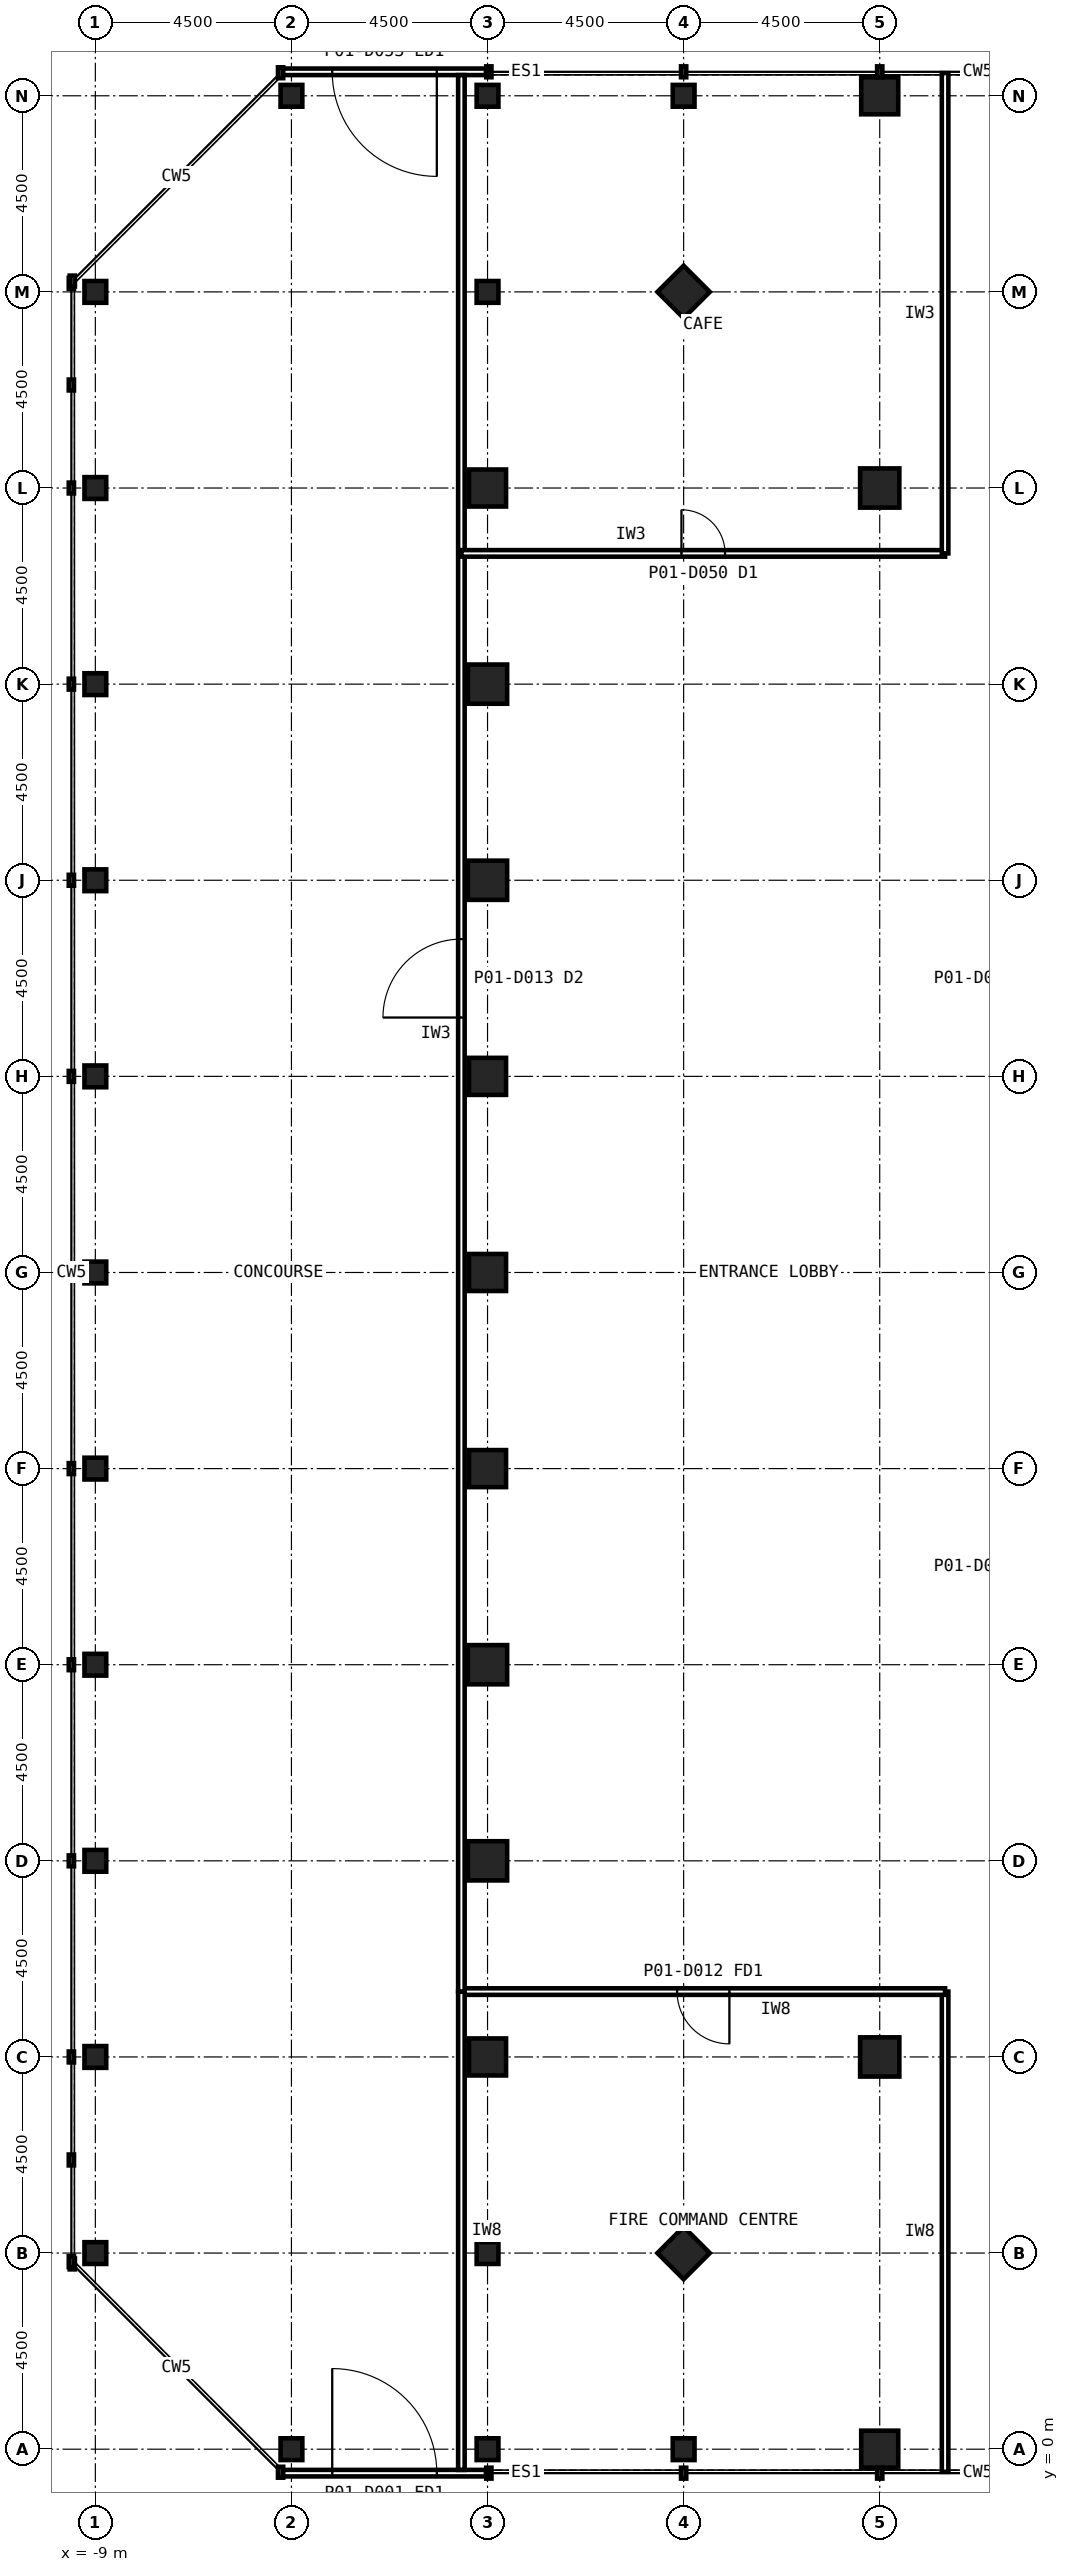
"""IFC4 building model, lengths in metres.
Left out: names, types, materials, properties, quantities, classifications, styles, units other than length and angle.
Written with IfcOpenShell. Run it as: python <this file> out.ifc"""

import sys

from ifc_helpers import new_model, si_unit, direction, frame, frame_2d, origin, origin_2d, place, context, subcontext, project, spatial, rectangle, hollow_rectangle, extrude, element, fill, save


model = new_model("IFC4")
c1 = context("Model", 3, precision=1e-05, world=origin(), true_north=direction((0.0, 1.0)))
c2 = subcontext(c1, "Body", "Model", "MODEL_VIEW")
j1 = project(units=[si_unit("LENGTHUNIT", "METRE"), si_unit("PLANEANGLEUNIT", "RADIAN")], contexts=[c1])
p1 = place(None, origin())
s1 = spatial("IfcSite", under=j1, at=p1, CompositionType="ELEMENT")
p2 = place(p1, origin())
s2 = spatial("IfcBuilding", under=s1, at=p2, CompositionType="ELEMENT")
p3 = place(p2, origin())
s3 = spatial("IfcBuildingStorey", under=s2, at=p3, CompositionType="ELEMENT", Elevation=0.0)
for number, where, z_axis, x_axis in (
    (1, (9.0, 0.0, -0.25), (0.0, 0.0, 1.0), (1.0, 0.0, 0.0)),
    (2, (9.0, 54.0, -0.25), (0.0, 0.0, 1.0), (1.0, 0.0, 0.0)),
    (3, (0.0, 45.0, -0.25), (0.0, 0.0, 1.0), (1.0, 0.0, 0.0)),
):
    element("IfcColumn", number, at=place(p3, frame(where, z_axis=z_axis, x_axis=x_axis)), inside=s3, PredefinedType="COLUMN", context=c2, shape_type="SweptSolid", body=[
        extrude(hollow_rectangle(XDim=0.85, YDim=0.85, WallThickness=0.05, at=origin_2d()), origin(), (0.0, 0.0, 1.0), 6.25),
    ])
for number, where, z_axis, x_axis in (
    (4, (0.0, 40.5, -0.25), (0.0, 0.0, 1.0), (1.0, 0.0, 0.0)),
    (5, (0.0, 36.0, -0.25), (0.0, 0.0, 1.0), (1.0, 0.0, 0.0)),
):
    element("IfcColumn", number, at=place(p3, frame(where, z_axis=z_axis, x_axis=x_axis)), inside=s3, PredefinedType="COLUMN", context=c2, shape_type="SweptSolid", body=[
        extrude(hollow_rectangle(XDim=0.9, YDim=0.9, WallThickness=0.063, at=origin_2d()), origin(), (0.0, 0.0, 1.0), 6.25),
    ])
for number, where, z_axis, x_axis in (
    (6, (0.0, 31.5, -0.25), (0.0, 0.0, 1.0), (1.0, 0.0, 0.0)),
    (7, (0.0, 27.0, -0.25), (0.0, 0.0, 1.0), (1.0, 0.0, 0.0)),
    (8, (0.0, 22.5, -0.25), (0.0, 0.0, 1.0), (1.0, 0.0, 0.0)),
):
    element("IfcColumn", number, at=place(p3, frame(where, z_axis=z_axis, x_axis=x_axis)), inside=s3, PredefinedType="COLUMN", context=c2, shape_type="SweptSolid", body=[
        extrude(hollow_rectangle(XDim=0.85, YDim=0.85, WallThickness=0.05, at=origin_2d()), origin(), (0.0, 0.0, 1.0), 6.25),
    ])
for number, where, z_axis, x_axis in (
    (9, (0.0, 18.0, -0.25), (0.0, 0.0, 1.0), (1.0, 0.0, 0.0)),
    (10, (0.0, 13.5, -0.25), (0.0, 0.0, 1.0), (1.0, 0.0, 0.0)),
):
    element("IfcColumn", number, at=place(p3, frame(where, z_axis=z_axis, x_axis=x_axis)), inside=s3, PredefinedType="COLUMN", context=c2, shape_type="SweptSolid", body=[
        extrude(hollow_rectangle(XDim=0.9, YDim=0.9, WallThickness=0.063, at=origin_2d()), origin(), (0.0, 0.0, 1.0), 6.25),
    ])
for number, where, z_axis, x_axis in (
    (11, (0.0, 9.0, -0.25), (0.0, 0.0, 1.0), (1.0, 0.0, 0.0)),
    (12, (4.5, 4.5, -0.25), (0.0, 0.0, 1.0), (0.707, 0.707, 0.0)),
    (13, (4.5, 49.5, -0.25), (0.0, 0.0, 1.0), (0.707, 0.707, 0.0)),
):
    element("IfcColumn", number, at=place(p3, frame(where, z_axis=z_axis, x_axis=x_axis)), inside=s3, PredefinedType="COLUMN", context=c2, shape_type="SweptSolid", body=[
        extrude(hollow_rectangle(XDim=0.85, YDim=0.85, WallThickness=0.05, at=origin_2d()), origin(), (0.0, 0.0, 1.0), 6.25),
    ])
for number, where, z_axis, x_axis in (
    (14, (9.0, 9.0, -0.25), (0.0, 0.0, 1.0), (1.0, 0.0, 0.0)),
    (15, (9.0, 45.0, -0.25), (0.0, 0.0, 1.0), (1.0, 0.0, 0.0)),
):
    element("IfcColumn", number, at=place(p3, frame(where, z_axis=z_axis, x_axis=x_axis)), inside=s3, PredefinedType="COLUMN", context=c2, shape_type="SweptSolid", body=[
        extrude(hollow_rectangle(XDim=0.9, YDim=0.9, WallThickness=0.063, at=origin_2d()), origin(), (0.0, 0.0, 1.0), 6.25),
    ])
for number, where, z_axis, x_axis in (
    (16, (-9.0, 4.5, -0.25), (0.0, 0.0, 1.0), (1.0, 0.0, 0.0)),
    (17, (-9.0, 9.0, -0.25), (0.0, 0.0, 1.0), (1.0, 0.0, 0.0)),
    (18, (-9.0, 13.5, -0.25), (0.0, 0.0, 1.0), (1.0, 0.0, 0.0)),
    (19, (-9.0, 18.0, -0.25), (0.0, 0.0, 1.0), (1.0, 0.0, 0.0)),
    (20, (-9.0, 22.5, -0.25), (0.0, 0.0, 1.0), (1.0, 0.0, 0.0)),
    (21, (-9.0, 27.0, -0.25), (0.0, 0.0, 1.0), (1.0, 0.0, 0.0)),
    (22, (-9.0, 31.5, -0.25), (0.0, 0.0, 1.0), (1.0, 0.0, 0.0)),
    (23, (-9.0, 36.0, -0.25), (0.0, 0.0, 1.0), (1.0, 0.0, 0.0)),
    (24, (-9.0, 40.5, -0.25), (0.0, 0.0, 1.0), (1.0, 0.0, 0.0)),
    (25, (-9.0, 45.0, -0.25), (0.0, 0.0, 1.0), (1.0, 0.0, 0.0)),
    (26, (-9.0, 49.5, -0.25), (0.0, 0.0, 1.0), (1.0, 0.0, 0.0)),
    (27, (-4.5, 0.0, -0.25), (0.0, 0.0, 1.0), (1.0, 0.0, 0.0)),
    (28, (-4.5, 54.0, -0.25), (0.0, 0.0, 1.0), (1.0, 0.0, 0.0)),
    (29, (0.0, 0.0, -0.25), (0.0, 0.0, 1.0), (1.0, 0.0, 0.0)),
    (30, (4.5, 0.0, -0.25), (0.0, 0.0, 1.0), (1.0, 0.0, 0.0)),
    (31, (0.0, 4.5, -0.25), (0.0, 0.0, 1.0), (1.0, 0.0, 0.0)),
    (32, (0.0, 54.0, -0.25), (0.0, 0.0, 1.0), (1.0, 0.0, 0.0)),
    (33, (4.5, 54.0, -0.25), (0.0, 0.0, 1.0), (1.0, 0.0, 0.0)),
    (34, (0.0, 49.5, -0.25), (0.0, 0.0, 1.0), (1.0, 0.0, 0.0)),
):
    element("IfcColumn", number, at=place(p3, frame(where, z_axis=z_axis, x_axis=x_axis)), inside=s3, PredefinedType="COLUMN", context=c2, shape_type="SweptSolid", body=[
        extrude(hollow_rectangle(XDim=0.5, YDim=0.5, WallThickness=0.022, at=origin_2d()), origin(), (0.0, 0.0, 1.0), 6.25),
    ])
p4 = place(p3, frame((-4.728, -0.55, 0.0), z_axis=(0.0, 0.0, 1.0), x_axis=(1.0, 0.0, 0.0)))
e35 = element("IfcWall", 35, at=p4, inside=s3, PredefinedType="USERDEFINED", context=c2, shape_type="SweptSolid", body=[
    extrude(rectangle(XDim=4.728, YDim=0.15, at=frame_2d((2.364, 0.0))), origin(), (0.0, 0.0, 1.0), 6.0),
])
p5 = place(p4, frame((1.164, 0.0, 0.0)))
e36 = element("IfcOpeningElement", 36, at=p5, cuts=e35, PredefinedType="OPENING", context=c2, shape_type="SweptSolid", body=[
    extrude(rectangle(XDim=2.4, YDim=2.7, at=frame_2d((1.2, 1.35))), frame((0.0, 0.085, 0.0), z_axis=(0.0, -1.0, 0.0), x_axis=(1.0, 0.0, 0.0)), (0.0, 0.0, 1.0), 0.17),
])
p6 = place(p3, frame((0.0, 54.55, 0.0), z_axis=(0.0, 0.0, 1.0), x_axis=(-1.0, 0.0, 0.0)))
e37 = element("IfcWall", 37, at=p6, inside=s3, PredefinedType="USERDEFINED", context=c2, shape_type="SweptSolid", body=[
    extrude(rectangle(XDim=4.728, YDim=0.15, at=frame_2d((2.364, 0.0))), origin(), (0.0, 0.0, 1.0), 6.0),
])
p7 = place(p6, frame((1.164, 0.0, 0.0)))
e38 = element("IfcOpeningElement", 38, at=p7, cuts=e37, PredefinedType="OPENING", context=c2, shape_type="SweptSolid", body=[
    extrude(rectangle(XDim=2.4, YDim=2.7, at=frame_2d((1.2, 1.35))), frame((0.0, 0.085, 0.0), z_axis=(0.0, -1.0, 0.0), x_axis=(1.0, 0.0, 0.0)), (0.0, 0.0, 1.0), 0.17),
])
p8 = place(p3, frame((10.5, -0.52, 0.0), z_axis=(0.0, 0.0, 1.0), x_axis=(0.0, 1.0, 0.0)))
e39 = element("IfcWall", 39, at=p8, inside=s3, PredefinedType="PARTITIONING", context=c2, shape_type="SweptSolid", body=[
    extrude(rectangle(XDim=11.02, YDim=0.15, at=frame_2d((5.51, 0.0))), origin(), (0.0, 0.0, 1.0), 5.8),
])
p9 = place(p3, frame((10.5, 10.5, 0.0), z_axis=(0.0, 0.0, 1.0), x_axis=(-1.0, 0.0, 0.0)))
e40 = element("IfcWall", 40, at=p9, inside=s3, PredefinedType="PARTITIONING", context=c2, shape_type="SweptSolid", body=[
    extrude(rectangle(XDim=11.1, YDim=0.15, at=frame_2d((5.55, 0.0))), origin(), (0.0, 0.0, 1.0), 5.8),
])
p10 = place(p9, frame((4.95, 0.0, 0.0)))
e41 = element("IfcOpeningElement", 41, at=p10, cuts=e40, PredefinedType="OPENING", context=c2, shape_type="SweptSolid", body=[
    extrude(rectangle(XDim=1.2, YDim=2.1, at=frame_2d((0.6, 1.05))), frame((0.0, 0.085, 0.0), z_axis=(0.0, -1.0, 0.0), x_axis=(1.0, 0.0, 0.0)), (0.0, 0.0, 1.0), 0.17),
])
p11 = place(p3, frame((-0.6, 10.5, 0.0), z_axis=(0.0, 0.0, 1.0), x_axis=(0.0, -1.0, 0.0)))
e42 = element("IfcWall", 42, at=p11, inside=s3, PredefinedType="PARTITIONING", context=c2, shape_type="SweptSolid", body=[
    extrude(rectangle(XDim=10.975, YDim=0.15, at=frame_2d((5.488, 0.0))), origin(), (0.0, 0.0, 1.0), 5.8),
])
p12 = place(p3, frame((-0.6, 10.5, 0.0), z_axis=(0.0, 0.0, 1.0), x_axis=(0.0, 1.0, 0.0)))
e43 = element("IfcWall", 43, at=p12, inside=s3, PredefinedType="PARTITIONING", context=c2, shape_type="SweptSolid", body=[
    extrude(rectangle(XDim=43.975, YDim=0.15, at=frame_2d((21.988, 0.0))), origin(), (0.0, 0.0, 1.0), 5.8),
])
p13 = place(p12, frame((22.35, 0.0, 0.0)))
e44 = element("IfcOpeningElement", 44, at=p13, cuts=e43, PredefinedType="OPENING", context=c2, shape_type="SweptSolid", body=[
    extrude(rectangle(XDim=1.8, YDim=2.4, at=frame_2d((0.9, 1.2))), frame((0.0, 0.085, 0.0), z_axis=(0.0, -1.0, 0.0), x_axis=(1.0, 0.0, 0.0)), (0.0, 0.0, 1.0), 0.17),
])
p14 = place(p3, frame((-0.6, 43.5, 0.0), z_axis=(0.0, 0.0, 1.0), x_axis=(1.0, 0.0, 0.0)))
e45 = element("IfcWall", 45, at=p14, inside=s3, PredefinedType="PARTITIONING", context=c2, shape_type="SweptSolid", body=[
    extrude(rectangle(XDim=11.1, YDim=0.15, at=frame_2d((5.55, 0.0))), origin(), (0.0, 0.0, 1.0), 5.8),
])
p15 = place(p14, frame((5.05, 0.0, 0.0)))
e46 = element("IfcOpeningElement", 46, at=p15, cuts=e45, PredefinedType="OPENING", context=c2, shape_type="SweptSolid", body=[
    extrude(rectangle(XDim=1.0, YDim=2.1, at=frame_2d((0.5, 1.05))), frame((0.0, 0.085, 0.0), z_axis=(0.0, -1.0, 0.0), x_axis=(1.0, 0.0, 0.0)), (0.0, 0.0, 1.0), 0.17),
])
p16 = place(p3, frame((10.5, 43.5, 0.0), z_axis=(0.0, 0.0, 1.0), x_axis=(0.0, 1.0, 0.0)))
e47 = element("IfcWall", 47, at=p16, inside=s3, PredefinedType="PARTITIONING", context=c2, shape_type="SweptSolid", body=[
    extrude(rectangle(XDim=11.02, YDim=0.15, at=frame_2d((5.51, 0.0))), origin(), (0.0, 0.0, 1.0), 5.8),
])
p17 = place(p5, origin())
e48 = element("IfcDoor", 48, at=p17, inside=s3, OperationType="SINGLE_SWING_LEFT", PredefinedType="DOOR", context=c2, shape_type="SweptSolid", body=[
    extrude(rectangle(XDim=2.4, YDim=2.7, at=frame_2d((1.2, 1.35))), frame((0.0, 0.025, 0.0), z_axis=(0.0, -1.0, 0.0), x_axis=(1.0, 0.0, 0.0)), (0.0, 0.0, 1.0), 0.05),
])
fill(e36, e48)
p18 = place(p7, origin())
e49 = element("IfcDoor", 49, at=p18, inside=s3, OperationType="SINGLE_SWING_LEFT", PredefinedType="DOOR", context=c2, shape_type="SweptSolid", body=[
    extrude(rectangle(XDim=2.4, YDim=2.7, at=frame_2d((1.2, 1.35))), frame((0.0, 0.025, 0.0), z_axis=(0.0, -1.0, 0.0), x_axis=(1.0, 0.0, 0.0)), (0.0, 0.0, 1.0), 0.05),
])
fill(e38, e49)
p19 = place(p10, origin())
e50 = element("IfcDoor", 50, at=p19, inside=s3, OperationType="SINGLE_SWING_LEFT", PredefinedType="DOOR", context=c2, shape_type="SweptSolid", body=[
    extrude(rectangle(XDim=1.2, YDim=2.1, at=frame_2d((0.6, 1.05))), frame((0.0, 0.025, 0.0), z_axis=(0.0, -1.0, 0.0), x_axis=(1.0, 0.0, 0.0)), (0.0, 0.0, 1.0), 0.05),
])
fill(e41, e50)
p20 = place(p13, origin())
e51 = element("IfcDoor", 51, at=p20, inside=s3, OperationType="SINGLE_SWING_LEFT", PredefinedType="DOOR", context=c2, shape_type="SweptSolid", body=[
    extrude(rectangle(XDim=1.8, YDim=2.4, at=frame_2d((0.9, 1.2))), frame((0.0, 0.025, 0.0), z_axis=(0.0, -1.0, 0.0), x_axis=(1.0, 0.0, 0.0)), (0.0, 0.0, 1.0), 0.05),
])
fill(e44, e51)
p21 = place(p15, origin())
e52 = element("IfcDoor", 52, at=p21, inside=s3, OperationType="SINGLE_SWING_LEFT", PredefinedType="DOOR", context=c2, shape_type="SweptSolid", body=[
    extrude(rectangle(XDim=1.0, YDim=2.1, at=frame_2d((0.5, 1.05))), frame((0.0, 0.025, 0.0), z_axis=(0.0, -1.0, 0.0), x_axis=(1.0, 0.0, 0.0)), (0.0, 0.0, 1.0), 0.05),
])
fill(e46, e52)
save(model, sys.argv[1])
